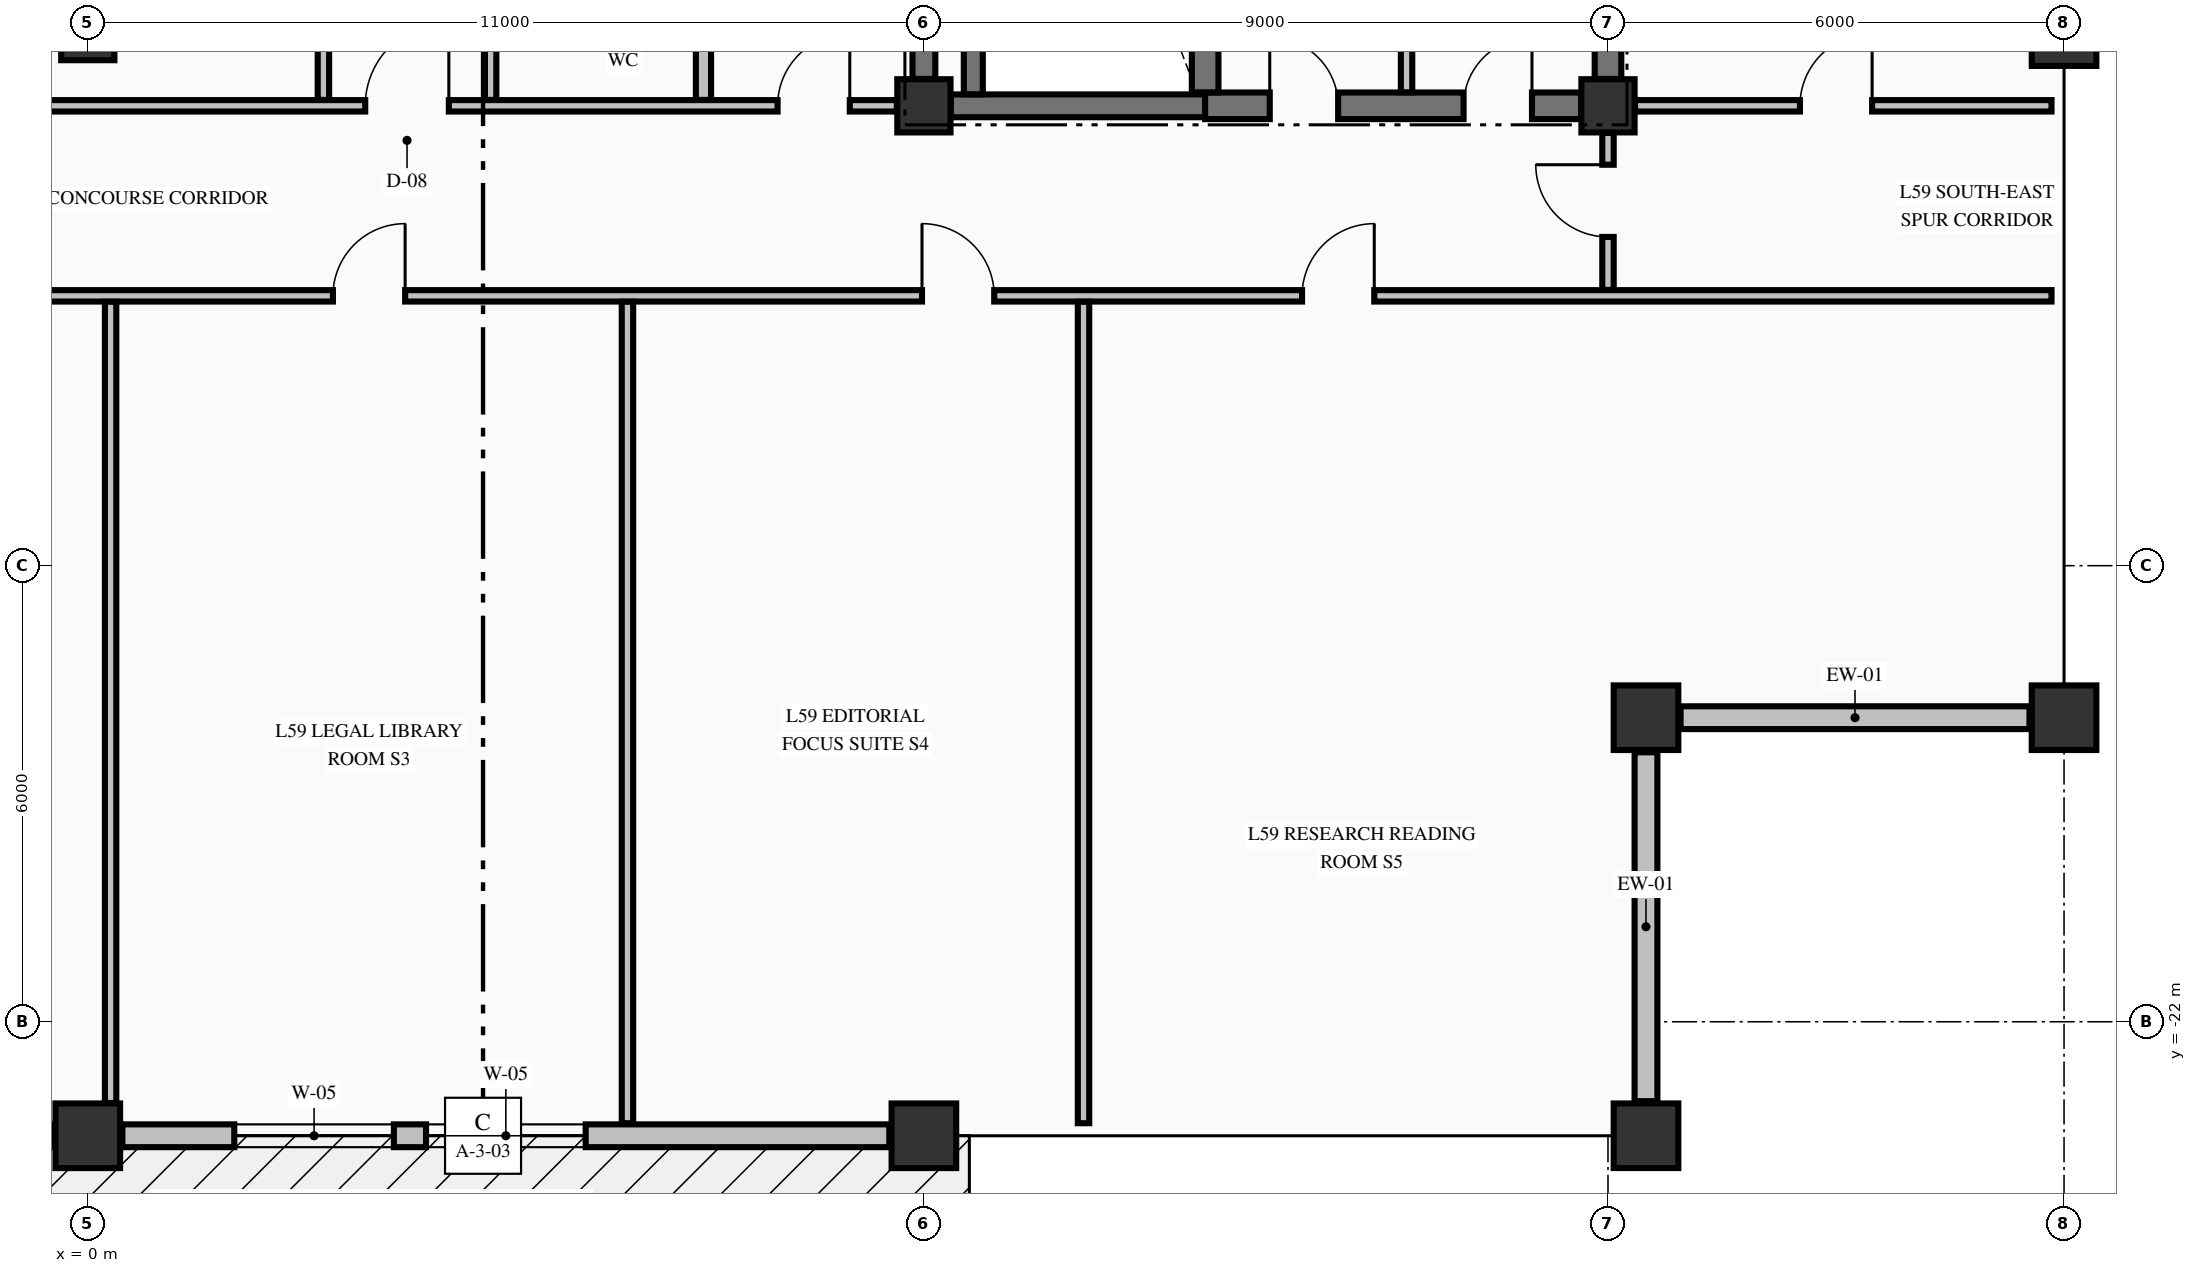
"""IFC4 building model, lengths in metres.
Left out: names, types, materials, properties, quantities, classifications, styles, units other than length and angle.
Written with IfcOpenShell. Run it as: python <this file> out.ifc"""

import sys

from ifc_helpers import new_model, si_unit, direction, frame, frame_2d, origin, origin_2d, place, context, subcontext, project, spatial, rectangle, extrude, element, fill, save


model = new_model("IFC4")
c1 = context("Model", 3, precision=1e-05, world=origin(), true_north=direction((0.0, 1.0)))
c2 = subcontext(c1, "Body", "Model", "MODEL_VIEW")
j1 = project(units=[si_unit("LENGTHUNIT", "METRE"), si_unit("PLANEANGLEUNIT", "RADIAN")], contexts=[c1])
p1 = place(None, origin())
s1 = spatial("IfcSite", under=j1, at=p1, CompositionType="ELEMENT")
p2 = place(p1, origin())
s2 = spatial("IfcBuilding", under=s1, at=p2, CompositionType="ELEMENT")
p3 = place(p2, frame((0.0, 0.0, 226.82)))
s3 = spatial("IfcBuildingStorey", under=s2, at=p3, CompositionType="ELEMENT", Elevation=226.82)
for number, where, z_axis, x_axis in (
    (1, (0.0, -23.5, -0.425), (0.0, 0.0, 1.0), (1.0, 0.0, 0.0)),
    (2, (11.0, -23.5, -0.425), (0.0, 0.0, 1.0), (1.0, 0.0, 0.0)),
    (3, (20.5, -23.5, -0.425), (0.0, 0.0, 1.0), (1.0, 0.0, 0.0)),
    (4, (26.0, -18.0, -0.425), (0.0, 0.0, 1.0), (1.0, 0.0, 0.0)),
    (5, (26.0, -9.0, -0.425), (0.0, 0.0, 1.0), (1.0, 0.0, 0.0)),
    (6, (20.5, -18.0, -0.425), (0.0, 0.0, 1.0), (1.0, 0.0, 0.0)),
):
    element("IfcColumn", number, at=place(p3, frame(where, z_axis=z_axis, x_axis=x_axis)), inside=s3, PredefinedType="COLUMN", context=c2, shape_type="SweptSolid", body=[
        extrude(rectangle(XDim=0.85, YDim=0.85, at=origin_2d()), origin(), (0.0, 0.0, 1.0), 3.405),
    ])
for number, where, z_axis, x_axis in (
    (7, (11.0, -9.95, -0.425), (0.0, 0.0, 1.0), (1.0, 0.0, 0.0)),
    (8, (20.0, -9.95, -0.425), (0.0, 0.0, 1.0), (1.0, 0.0, 0.0)),
    (9, (0.0, -9.0, -0.425), (0.0, 0.0, 1.0), (1.0, 0.0, 0.0)),
):
    element("IfcColumn", number, at=place(p3, frame(where, z_axis=z_axis, x_axis=x_axis)), inside=s3, PredefinedType="COLUMN", context=c2, shape_type="SweptSolid", body=[
        extrude(rectangle(XDim=0.7, YDim=0.7, at=origin_2d()), origin(), (0.0, 0.0, 1.0), 3.405),
    ])
for number, where, z_axis, x_axis in (
    (10, (20.5, -23.045, 0.0), (0.0, 0.0, 1.0), (0.0, 1.0, 0.0)),
    (11, (20.955, -18.0, 0.0), (0.0, 0.0, 1.0), (1.0, 0.0, 0.0)),
):
    element("IfcWall", number, at=place(p3, frame(where, z_axis=z_axis, x_axis=x_axis)), inside=s3, PredefinedType="STANDARD", context=c2, shape_type="SweptSolid", body=[
        extrude(rectangle(XDim=4.59, YDim=0.3, at=frame_2d((2.295, 0.0))), origin(), (0.0, 0.0, 1.0), 1.172),
    ])
p4 = place(p3, frame((-10.545, -23.5, 0.0), z_axis=(0.0, 0.0, 1.0), x_axis=(1.0, 0.0, 0.0)))
e12 = element("IfcWall", 12, at=p4, inside=s3, PredefinedType="STANDARD", context=c2, shape_type="SweptSolid", body=[
    extrude(rectangle(XDim=10.09, YDim=0.3, at=frame_2d((5.045, 0.0))), origin(), (0.0, 0.0, 1.0), 2.372),
])
p5 = place(p4, frame((5.569, 0.0, 0.0)))
e13 = element("IfcOpeningElement", 13, at=p5, cuts=e12, PredefinedType="OPENING", context=c2, shape_type="SweptSolid", body=[
    extrude(rectangle(XDim=1.1, YDim=2.15, at=frame_2d((0.55, 1.075))), frame((0.0, 0.16, 0.0), z_axis=(0.0, -1.0, 0.0), x_axis=(1.0, 0.0, 0.0)), (0.0, 0.0, 1.0), 0.32),
])
p6 = place(p3, frame((0.455, -23.5, 0.0), z_axis=(0.0, 0.0, 1.0), x_axis=(1.0, 0.0, 0.0)))
e14 = element("IfcWall", 14, at=p6, inside=s3, PredefinedType="STANDARD", context=c2, shape_type="SweptSolid", body=[
    extrude(rectangle(XDim=10.09, YDim=0.3, at=frame_2d((5.045, 0.0))), origin(), (0.0, 0.0, 1.0), 2.372),
])
p7 = place(p6, frame((1.472, 0.0, 0.7)))
e15 = element("IfcOpeningElement", 15, at=p7, cuts=e14, PredefinedType="OPENING", context=c2, shape_type="SweptSolid", body=[
    extrude(rectangle(XDim=2.1, YDim=1.5, at=frame_2d((1.05, 0.75))), frame((0.0, 0.16, 0.0), z_axis=(0.0, -1.0, 0.0), x_axis=(1.0, 0.0, 0.0)), (0.0, 0.0, 1.0), 0.32),
])
p8 = place(p6, frame((3.995, 0.0, 0.7)))
e16 = element("IfcOpeningElement", 16, at=p8, cuts=e14, PredefinedType="OPENING", context=c2, shape_type="SweptSolid", body=[
    extrude(rectangle(XDim=2.1, YDim=1.5, at=frame_2d((1.05, 0.75))), frame((0.0, 0.16, 0.0), z_axis=(0.0, -1.0, 0.0), x_axis=(1.0, 0.0, 0.0)), (0.0, 0.0, 1.0), 0.32),
])
p9 = place(p3, frame((11.354, -9.95, 0.0), z_axis=(0.0, 0.0, 1.0), x_axis=(1.0, 0.0, 0.0)))
e17 = element("IfcWall", 17, at=p9, inside=s3, PredefinedType="SHEAR", context=c2, shape_type="SweptSolid", body=[
    extrude(rectangle(XDim=3.346, YDim=0.3, at=frame_2d((1.673, 0.0))), origin(), (0.0, 0.0, 1.0), 2.98),
])
p10 = place(p3, frame((14.7, -9.95, 0.0), z_axis=(0.0, 0.0, 1.0), x_axis=(1.0, 0.0, 0.0)))
e18 = element("IfcWall", 18, at=p10, inside=s3, PredefinedType="SHEAR", context=c2, shape_type="SweptSolid", body=[
    extrude(rectangle(XDim=4.946, YDim=0.35, at=frame_2d((2.473, 0.0))), origin(), (0.0, 0.0, 1.0), 2.98),
])
p11 = place(p10, frame((0.85, 0.0, 0.0)))
e19 = element("IfcOpeningElement", 19, at=p11, cuts=e18, PredefinedType="OPENING", context=c2, shape_type="SweptSolid", body=[
    extrude(rectangle(XDim=0.9, YDim=2.15, at=frame_2d((0.45, 1.075))), frame((0.0, 0.185, 0.0), z_axis=(0.0, -1.0, 0.0), x_axis=(1.0, 0.0, 0.0)), (0.0, 0.0, 1.0), 0.37),
])
p12 = place(p10, frame((3.4, 0.0, 0.0)))
e20 = element("IfcOpeningElement", 20, at=p12, cuts=e18, PredefinedType="OPENING", context=c2, shape_type="SweptSolid", body=[
    extrude(rectangle(XDim=0.9, YDim=2.15, at=frame_2d((0.45, 1.075))), frame((0.0, 0.185, 0.0), z_axis=(0.0, -1.0, 0.0), x_axis=(1.0, 0.0, 0.0)), (0.0, 0.0, 1.0), 0.37),
])
p13 = place(p3, frame((-20.075, -12.45, 0.0), z_axis=(0.0, 0.0, 1.0), x_axis=(1.0, 0.0, 0.0)))
e21 = element("IfcWall", 21, at=p13, inside=s3, PredefinedType="PARTITIONING", context=c2, shape_type="SweptSolid", body=[
    extrude(rectangle(XDim=45.91, YDim=0.15, at=frame_2d((22.955, 0.0))), origin(), (0.0, 0.0, 1.0), 2.98),
])
p14 = place(p13, frame((9.05, 0.0, 0.0)))
e22 = element("IfcOpeningElement", 22, at=p14, cuts=e21, PredefinedType="OPENING", context=c2, shape_type="SweptSolid", body=[
    extrude(rectangle(XDim=0.95, YDim=2.15, at=frame_2d((0.475, 1.075))), frame((0.0, 0.085, 0.0), z_axis=(0.0, -1.0, 0.0), x_axis=(1.0, 0.0, 0.0)), (0.0, 0.0, 1.0), 0.17),
])
p15 = place(p13, frame((15.25, 0.0, 0.0)))
e23 = element("IfcOpeningElement", 23, at=p15, cuts=e21, PredefinedType="OPENING", context=c2, shape_type="SweptSolid", body=[
    extrude(rectangle(XDim=1.05, YDim=2.15, at=frame_2d((0.525, 1.075))), frame((0.0, 0.085, 0.0), z_axis=(0.0, -1.0, 0.0), x_axis=(1.0, 0.0, 0.0)), (0.0, 0.0, 1.0), 0.17),
])
p16 = place(p13, frame((23.3, 0.0, 0.0)))
e24 = element("IfcOpeningElement", 24, at=p16, cuts=e21, PredefinedType="OPENING", context=c2, shape_type="SweptSolid", body=[
    extrude(rectangle(XDim=0.95, YDim=2.15, at=frame_2d((0.475, 1.075))), frame((0.0, 0.085, 0.0), z_axis=(0.0, -1.0, 0.0), x_axis=(1.0, 0.0, 0.0)), (0.0, 0.0, 1.0), 0.17),
])
p17 = place(p13, frame((31.05, 0.0, 0.0)))
e25 = element("IfcOpeningElement", 25, at=p17, cuts=e21, PredefinedType="OPENING", context=c2, shape_type="SweptSolid", body=[
    extrude(rectangle(XDim=0.95, YDim=2.15, at=frame_2d((0.475, 1.075))), frame((0.0, 0.085, 0.0), z_axis=(0.0, -1.0, 0.0), x_axis=(1.0, 0.0, 0.0)), (0.0, 0.0, 1.0), 0.17),
])
p18 = place(p13, frame((36.05, 0.0, 0.0)))
e26 = element("IfcOpeningElement", 26, at=p18, cuts=e21, PredefinedType="OPENING", context=c2, shape_type="SweptSolid", body=[
    extrude(rectangle(XDim=0.95, YDim=2.15, at=frame_2d((0.475, 1.075))), frame((0.0, 0.085, 0.0), z_axis=(0.0, -1.0, 0.0), x_axis=(1.0, 0.0, 0.0)), (0.0, 0.0, 1.0), 0.17),
])
p19 = place(p3, frame((-10.644, -9.95, 0.0), z_axis=(0.0, 0.0, 1.0), x_axis=(1.0, 0.0, 0.0)))
e27 = element("IfcWall", 27, at=p19, inside=s3, PredefinedType="PARTITIONING", context=c2, shape_type="SweptSolid", body=[
    extrude(rectangle(XDim=21.288, YDim=0.15, at=frame_2d((10.644, 0.0))), origin(), (0.0, 0.0, 1.0), 2.98),
])
p20 = place(p19, frame((14.294, 0.0, 0.0)))
e28 = element("IfcOpeningElement", 28, at=p20, cuts=e27, PredefinedType="OPENING", context=c2, shape_type="SweptSolid", body=[
    extrude(rectangle(XDim=1.1, YDim=2.15, at=frame_2d((0.55, 1.075))), frame((0.0, 0.085, 0.0), z_axis=(0.0, -1.0, 0.0), x_axis=(1.0, 0.0, 0.0)), (0.0, 0.0, 1.0), 0.17),
])
p21 = place(p19, frame((19.719, 0.0, 0.0)))
e29 = element("IfcOpeningElement", 29, at=p21, cuts=e27, PredefinedType="OPENING", context=c2, shape_type="SweptSolid", body=[
    extrude(rectangle(XDim=0.95, YDim=2.15, at=frame_2d((0.475, 1.075))), frame((0.0, 0.085, 0.0), z_axis=(0.0, -1.0, 0.0), x_axis=(1.0, 0.0, 0.0)), (0.0, 0.0, 1.0), 0.17),
])
p22 = place(p3, frame((20.356, -9.95, 0.0), z_axis=(0.0, 0.0, 1.0), x_axis=(1.0, 0.0, 0.0)))
e30 = element("IfcWall", 30, at=p22, inside=s3, PredefinedType="PARTITIONING", context=c2, shape_type="SweptSolid", body=[
    extrude(rectangle(XDim=5.479, YDim=0.15, at=frame_2d((2.74, 0.0))), origin(), (0.0, 0.0, 1.0), 2.98),
])
p23 = place(p22, frame((2.169, 0.0, 0.0)))
e31 = element("IfcOpeningElement", 31, at=p23, cuts=e30, PredefinedType="OPENING", context=c2, shape_type="SweptSolid", body=[
    extrude(rectangle(XDim=0.95, YDim=2.15, at=frame_2d((0.475, 1.075))), frame((0.0, 0.085, 0.0), z_axis=(0.0, -1.0, 0.0), x_axis=(1.0, 0.0, 0.0)), (0.0, 0.0, 1.0), 0.17),
])
p24 = place(p3, frame((11.0, -9.596, 0.0), z_axis=(0.0, 0.0, 1.0), x_axis=(0.0, 1.0, 0.0)))
e32 = element("IfcWall", 32, at=p24, inside=s3, PredefinedType="SHEAR", context=c2, shape_type="SweptSolid", body=[
    extrude(rectangle(XDim=9.242, YDim=0.3, at=frame_2d((4.621, 0.0))), origin(), (0.0, 0.0, 1.0), 2.98),
])
p25 = place(p3, frame((11.65, -9.798, 0.0), z_axis=(0.0, 0.0, 1.0), x_axis=(0.0, 1.0, 0.0)))
e33 = element("IfcWall", 33, at=p25, inside=s3, PredefinedType="SOLIDWALL", context=c2, shape_type="SweptSolid", body=[
    extrude(rectangle(XDim=9.396, YDim=0.25, at=frame_2d((4.698, 0.0))), origin(), (0.0, 0.0, 1.0), 2.98),
])
p26 = place(p3, frame((14.7, -9.773, 0.0), z_axis=(0.0, 0.0, 1.0), x_axis=(0.0, 1.0, 0.0)))
e34 = element("IfcWall", 34, at=p26, inside=s3, PredefinedType="SHEAR", context=c2, shape_type="SweptSolid", body=[
    extrude(rectangle(XDim=9.371, YDim=0.35, at=frame_2d((4.686, 0.0))), origin(), (0.0, 0.0, 1.0), 2.98),
])
p27 = place(p3, frame((20.0, -9.596, 0.0), z_axis=(0.0, 0.0, 1.0), x_axis=(0.0, 1.0, 0.0)))
e35 = element("IfcWall", 35, at=p27, inside=s3, PredefinedType="SHEAR", context=c2, shape_type="SweptSolid", body=[
    extrude(rectangle(XDim=9.242, YDim=0.35, at=frame_2d((4.621, 0.0))), origin(), (0.0, 0.0, 1.0), 2.98),
])
p28 = place(p3, frame((0.3, -23.069, 0.0), z_axis=(0.0, 0.0, 1.0), x_axis=(0.0, 1.0, 0.0)))
e36 = element("IfcWall", 36, at=p28, inside=s3, PredefinedType="PARTITIONING", context=c2, shape_type="SweptSolid", body=[
    extrude(rectangle(XDim=10.541, YDim=0.15, at=frame_2d((5.271, 0.0))), origin(), (0.0, 0.0, 1.0), 2.395),
])
p29 = place(p3, frame((3.1, -9.872, 0.0), z_axis=(0.0, 0.0, 1.0), x_axis=(0.0, 1.0, 0.0)))
e37 = element("IfcWall", 37, at=p29, inside=s3, PredefinedType="PARTITIONING", context=c2, shape_type="SweptSolid", body=[
    extrude(rectangle(XDim=9.544, YDim=0.15, at=frame_2d((4.772, 0.0))), origin(), (0.0, 0.0, 1.0), 2.98),
])
p30 = place(p3, frame((5.3, -9.872, 0.0), z_axis=(0.0, 0.0, 1.0), x_axis=(0.0, 1.0, 0.0)))
e38 = element("IfcWall", 38, at=p30, inside=s3, PredefinedType="PARTITIONING", context=c2, shape_type="SweptSolid", body=[
    extrude(rectangle(XDim=4.919, YDim=0.15, at=frame_2d((2.459, 0.0))), origin(), (0.0, 0.0, 1.0), 2.98),
])
p31 = place(p30, frame((1.997, 0.0, 0.0)))
e39 = element("IfcOpeningElement", 39, at=p31, cuts=e38, PredefinedType="OPENING", context=c2, shape_type="SweptSolid", body=[
    extrude(rectangle(XDim=0.95, YDim=2.15, at=frame_2d((0.475, 1.075))), frame((0.0, 0.085, 0.0), z_axis=(0.0, -1.0, 0.0), x_axis=(1.0, 0.0, 0.0)), (0.0, 0.0, 1.0), 0.17),
])
p32 = place(p3, frame((7.1, -23.335, 0.0), z_axis=(0.0, 0.0, 1.0), x_axis=(0.0, 1.0, 0.0)))
e40 = element("IfcWall", 40, at=p32, inside=s3, PredefinedType="PARTITIONING", context=c2, shape_type="SweptSolid", body=[
    extrude(rectangle(XDim=10.807, YDim=0.15, at=frame_2d((5.403, 0.0))), origin(), (0.0, 0.0, 1.0), 2.98),
])
p33 = place(p3, frame((8.1, -9.872, 0.0), z_axis=(0.0, 0.0, 1.0), x_axis=(0.0, 1.0, 0.0)))
e41 = element("IfcWall", 41, at=p33, inside=s3, PredefinedType="PARTITIONING", context=c2, shape_type="SweptSolid", body=[
    extrude(rectangle(XDim=4.919, YDim=0.2, at=frame_2d((2.459, 0.0))), origin(), (0.0, 0.0, 1.0), 2.98),
])
p34 = place(p3, frame((13.1, -23.335, 0.0), z_axis=(0.0, 0.0, 1.0), x_axis=(0.0, 1.0, 0.0)))
e42 = element("IfcWall", 42, at=p34, inside=s3, PredefinedType="PARTITIONING", context=c2, shape_type="SweptSolid", body=[
    extrude(rectangle(XDim=10.807, YDim=0.15, at=frame_2d((5.403, 0.0))), origin(), (0.0, 0.0, 1.0), 2.98),
])
p35 = place(p3, frame((17.35, -9.772, 0.0), z_axis=(0.0, 0.0, 1.0), x_axis=(0.0, 1.0, 0.0)))
e43 = element("IfcWall", 43, at=p35, inside=s3, PredefinedType="PARTITIONING", context=c2, shape_type="SweptSolid", body=[
    extrude(rectangle(XDim=14.494, YDim=0.15, at=frame_2d((7.247, 0.0))), origin(), (0.0, 0.0, 1.0), 2.98),
])
p36 = place(p3, frame((20.0, -12.372, 0.0), z_axis=(0.0, 0.0, 1.0), x_axis=(0.0, 1.0, 0.0)))
e44 = element("IfcWall", 44, at=p36, inside=s3, PredefinedType="PARTITIONING", context=c2, shape_type="SweptSolid", body=[
    extrude(rectangle(XDim=2.066, YDim=0.15, at=frame_2d((1.033, 0.0))), origin(), (0.0, 0.0, 1.0), 2.98),
])
p37 = place(p36, frame((0.697, 0.0, 0.0)))
e45 = element("IfcOpeningElement", 45, at=p37, cuts=e44, PredefinedType="OPENING", context=c2, shape_type="SweptSolid", body=[
    extrude(rectangle(XDim=0.95, YDim=2.15, at=frame_2d((0.475, 1.075))), frame((0.0, 0.085, 0.0), z_axis=(0.0, -1.0, 0.0), x_axis=(1.0, 0.0, 0.0)), (0.0, 0.0, 1.0), 0.17),
])
p38 = place(p7, origin())
e46 = element("IfcWindow", 46, at=p38, inside=s3, PartitioningType="SINGLE_PANEL", PredefinedType="WINDOW", context=c2, shape_type="SweptSolid", body=[
    extrude(rectangle(XDim=2.1, YDim=1.5, at=frame_2d((1.05, 0.75))), frame((0.0, 0.03, 0.0), z_axis=(0.0, -1.0, 0.0), x_axis=(1.0, 0.0, 0.0)), (0.0, 0.0, 1.0), 0.06),
])
fill(e15, e46)
p39 = place(p8, origin())
e47 = element("IfcWindow", 47, at=p39, inside=s3, PartitioningType="SINGLE_PANEL", PredefinedType="WINDOW", context=c2, shape_type="SweptSolid", body=[
    extrude(rectangle(XDim=2.1, YDim=1.5, at=frame_2d((1.05, 0.75))), frame((0.0, 0.03, 0.0), z_axis=(0.0, -1.0, 0.0), x_axis=(1.0, 0.0, 0.0)), (0.0, 0.0, 1.0), 0.06),
])
fill(e16, e47)
p40 = place(p11, origin())
e48 = element("IfcDoor", 48, at=p40, inside=s3, OperationType="SINGLE_SWING_LEFT", PredefinedType="DOOR", context=c2, shape_type="SweptSolid", body=[
    extrude(rectangle(XDim=0.9, YDim=2.15, at=frame_2d((0.45, 1.075))), frame((0.0, 0.025, 0.0), z_axis=(0.0, -1.0, 0.0), x_axis=(1.0, 0.0, 0.0)), (0.0, 0.0, 1.0), 0.05),
])
fill(e19, e48)
p41 = place(p12, origin())
e49 = element("IfcDoor", 49, at=p41, inside=s3, OperationType="SINGLE_SWING_RIGHT", PredefinedType="DOOR", context=c2, shape_type="SweptSolid", body=[
    extrude(rectangle(XDim=0.9, YDim=2.15, at=frame_2d((0.45, 1.075))), frame((0.0, 0.025, 0.0), z_axis=(0.0, -1.0, 0.0), x_axis=(1.0, 0.0, 0.0)), (0.0, 0.0, 1.0), 0.05),
])
fill(e20, e49)
p42 = place(p20, origin())
e50 = element("IfcDoor", 50, at=p42, inside=s3, OperationType="SINGLE_SWING_RIGHT", PredefinedType="DOOR", context=c2, shape_type="SweptSolid", body=[
    extrude(rectangle(XDim=1.1, YDim=2.15, at=frame_2d((0.55, 1.075))), frame((0.0, 0.025, 0.0), z_axis=(0.0, -1.0, 0.0), x_axis=(1.0, 0.0, 0.0)), (0.0, 0.0, 1.0), 0.05),
])
fill(e28, e50)
p43 = place(p16, origin())
e51 = element("IfcDoor", 51, at=p43, inside=s3, OperationType="SINGLE_SWING_RIGHT", PredefinedType="DOOR", context=c2, shape_type="SweptSolid", body=[
    extrude(rectangle(XDim=0.95, YDim=2.15, at=frame_2d((0.475, 1.075))), frame((0.0, 0.025, 0.0), z_axis=(0.0, -1.0, 0.0), x_axis=(1.0, 0.0, 0.0)), (0.0, 0.0, 1.0), 0.05),
])
fill(e24, e51)
p44 = place(p17, origin())
e52 = element("IfcDoor", 52, at=p44, inside=s3, OperationType="SINGLE_SWING_LEFT", PredefinedType="DOOR", context=c2, shape_type="SweptSolid", body=[
    extrude(rectangle(XDim=0.95, YDim=2.15, at=frame_2d((0.475, 1.075))), frame((0.0, 0.025, 0.0), z_axis=(0.0, -1.0, 0.0), x_axis=(1.0, 0.0, 0.0)), (0.0, 0.0, 1.0), 0.05),
])
fill(e25, e52)
p45 = place(p18, origin())
e53 = element("IfcDoor", 53, at=p45, inside=s3, OperationType="SINGLE_SWING_RIGHT", PredefinedType="DOOR", context=c2, shape_type="SweptSolid", body=[
    extrude(rectangle(XDim=0.95, YDim=2.15, at=frame_2d((0.475, 1.075))), frame((0.0, 0.025, 0.0), z_axis=(0.0, -1.0, 0.0), x_axis=(1.0, 0.0, 0.0)), (0.0, 0.0, 1.0), 0.05),
])
fill(e26, e53)
p46 = place(p21, origin())
e54 = element("IfcDoor", 54, at=p46, inside=s3, OperationType="SINGLE_SWING_RIGHT", PredefinedType="DOOR", context=c2, shape_type="SweptSolid", body=[
    extrude(rectangle(XDim=0.95, YDim=2.15, at=frame_2d((0.475, 1.075))), frame((0.0, 0.025, 0.0), z_axis=(0.0, -1.0, 0.0), x_axis=(1.0, 0.0, 0.0)), (0.0, 0.0, 1.0), 0.05),
])
fill(e29, e54)
p47 = place(p37, origin())
e55 = element("IfcDoor", 55, at=p47, inside=s3, OperationType="SINGLE_SWING_RIGHT", PredefinedType="DOOR", context=c2, shape_type="SweptSolid", body=[
    extrude(rectangle(XDim=0.95, YDim=2.15, at=frame_2d((0.475, 1.075))), frame((0.0, 0.025, 0.0), z_axis=(0.0, -1.0, 0.0), x_axis=(1.0, 0.0, 0.0)), (0.0, 0.0, 1.0), 0.05),
])
fill(e45, e55)
p48 = place(p23, origin())
e56 = element("IfcDoor", 56, at=p48, inside=s3, OperationType="SINGLE_SWING_RIGHT", PredefinedType="DOOR", context=c2, shape_type="SweptSolid", body=[
    extrude(rectangle(XDim=0.95, YDim=2.15, at=frame_2d((0.475, 1.075))), frame((0.0, 0.025, 0.0), z_axis=(0.0, -1.0, 0.0), x_axis=(1.0, 0.0, 0.0)), (0.0, 0.0, 1.0), 0.05),
])
fill(e31, e56)
save(model, sys.argv[1])
